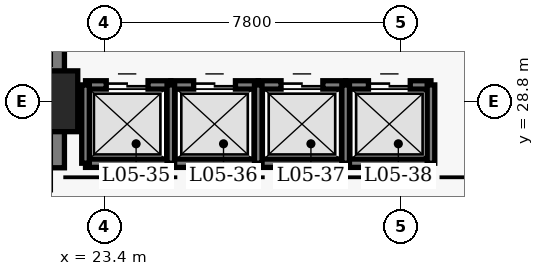
"""IFC4 building model, lengths in metres.
Left out: names, types, materials, properties, quantities, classifications, styles, units other than length and angle.
Written with IfcOpenShell. Run it as: python <this file> out.ifc"""

import sys

from ifc_helpers import new_model, si_unit, direction, frame, frame_2d, origin, origin_2d, place, context, subcontext, project, spatial, rectangle, extrude, element, fill, save


model = new_model("IFC4")
c1 = context("Model", 3, precision=1e-05, world=origin(), true_north=direction((0.0, 1.0)))
c2 = subcontext(c1, "Body", "Model", "MODEL_VIEW")
j1 = project(units=[si_unit("LENGTHUNIT", "METRE"), si_unit("PLANEANGLEUNIT", "RADIAN")], contexts=[c1])
p1 = place(None, origin())
s1 = spatial("IfcSite", under=j1, at=p1, CompositionType="ELEMENT")
p2 = place(p1, origin())
s2 = spatial("IfcBuilding", under=s1, at=p2, CompositionType="ELEMENT")
p3 = place(p2, frame((0.0, 0.0, 26.0)))
s3 = spatial("IfcBuildingStorey", under=s2, at=p3, CompositionType="ELEMENT", Elevation=26.0)
p4 = place(p3, frame((21.9, 27.05, 0.0), z_axis=(0.0, 0.0, 1.0), x_axis=(0.0, 1.0, 0.0)))
e1 = element("IfcWall", 1, at=p4, inside=s3, PredefinedType="SHEAR", context=c2, shape_type="SweptSolid", body=[
    extrude(rectangle(XDim=13.72, YDim=0.9, at=frame_2d((6.86, 0.0))), origin(), (0.0, 0.0, 1.0), 3.8),
])
p5 = place(p3, frame((21.9, 28.8, 0.0), z_axis=(0.0, 0.0, 1.0), x_axis=(1.0, 0.0, 0.0)))
e2 = element("IfcColumn", 2, at=p5, inside=s3, PredefinedType="COLUMN", context=c2, shape_type="SweptSolid", body=[
    extrude(rectangle(XDim=1.6, YDim=1.6, at=origin_2d()), origin(), (0.0, 0.0, 1.0), 3.8),
])
p6 = place(p3, frame((22.905, 29.23, 0.0), z_axis=(0.0, 0.0, 1.0), x_axis=(1.0, 0.0, 0.0)))
e3 = element("IfcWall", 3, at=p6, inside=s3, PredefinedType="SHEAR", context=c2, shape_type="SweptSolid", body=[
    extrude(rectangle(XDim=2.245, YDim=0.22, at=frame_2d((1.123, 0.0))), origin(), (0.0, 0.0, 1.0), 3.8),
])
p7 = place(p6, frame((0.545, 0.0, 0.0)))
e4 = element("IfcOpeningElement", 4, at=p7, cuts=e3, PredefinedType="OPENING", context=c2, shape_type="SweptSolid", body=[
    extrude(rectangle(XDim=1.1, YDim=2.15, at=frame_2d((0.55, 1.075))), frame((0.0, 0.12, 0.0), z_axis=(0.0, -1.0, 0.0), x_axis=(1.0, 0.0, 0.0)), (0.0, 0.0, 1.0), 0.24),
])
p8 = place(p3, frame((22.905, 27.17, 0.0), z_axis=(0.0, 0.0, 1.0), x_axis=(1.0, 0.0, 0.0)))
e5 = element("IfcWall", 5, at=p8, inside=s3, PredefinedType="SHEAR", context=c2, shape_type="SweptSolid", body=[
    extrude(rectangle(XDim=2.245, YDim=0.22, at=frame_2d((1.123, 0.0))), origin(), (0.0, 0.0, 1.0), 3.8),
])
p9 = place(p3, frame((22.905, 27.17, 0.0), z_axis=(0.0, 0.0, 1.0), x_axis=(0.0, 1.0, 0.0)))
e6 = element("IfcWall", 6, at=p9, inside=s3, PredefinedType="SHEAR", context=c2, shape_type="SweptSolid", body=[
    extrude(rectangle(XDim=2.06, YDim=0.2, at=frame_2d((1.03, 0.0))), origin(), (0.0, 0.0, 1.0), 3.8),
])
p10 = place(p3, frame((25.15, 29.23, 0.0), z_axis=(0.0, 0.0, 1.0), x_axis=(1.0, 0.0, 0.0)))
e7 = element("IfcWall", 7, at=p10, inside=s3, PredefinedType="SHEAR", context=c2, shape_type="SweptSolid", body=[
    extrude(rectangle(XDim=2.3, YDim=0.22, at=frame_2d((1.15, 0.0))), origin(), (0.0, 0.0, 1.0), 3.8),
])
p11 = place(p10, frame((0.6, 0.0, 0.0)))
e8 = element("IfcOpeningElement", 8, at=p11, cuts=e7, PredefinedType="OPENING", context=c2, shape_type="SweptSolid", body=[
    extrude(rectangle(XDim=1.1, YDim=2.15, at=frame_2d((0.55, 1.075))), frame((0.0, 0.12, 0.0), z_axis=(0.0, -1.0, 0.0), x_axis=(1.0, 0.0, 0.0)), (0.0, 0.0, 1.0), 0.24),
])
p12 = place(p3, frame((25.15, 27.17, 0.0), z_axis=(0.0, 0.0, 1.0), x_axis=(1.0, 0.0, 0.0)))
e9 = element("IfcWall", 9, at=p12, inside=s3, PredefinedType="SHEAR", context=c2, shape_type="SweptSolid", body=[
    extrude(rectangle(XDim=2.3, YDim=0.22, at=frame_2d((1.15, 0.0))), origin(), (0.0, 0.0, 1.0), 3.8),
])
p13 = place(p3, frame((25.15, 27.17, 0.0), z_axis=(0.0, 0.0, 1.0), x_axis=(0.0, 1.0, 0.0)))
e10 = element("IfcWall", 10, at=p13, inside=s3, PredefinedType="SHEAR", context=c2, shape_type="SweptSolid", body=[
    extrude(rectangle(XDim=2.06, YDim=0.2, at=frame_2d((1.03, 0.0))), origin(), (0.0, 0.0, 1.0), 3.8),
])
p14 = place(p3, frame((27.45, 29.23, 0.0), z_axis=(0.0, 0.0, 1.0), x_axis=(1.0, 0.0, 0.0)))
e11 = element("IfcWall", 11, at=p14, inside=s3, PredefinedType="SHEAR", context=c2, shape_type="SweptSolid", body=[
    extrude(rectangle(XDim=2.3, YDim=0.22, at=frame_2d((1.15, 0.0))), origin(), (0.0, 0.0, 1.0), 3.8),
])
p15 = place(p14, frame((0.6, 0.0, 0.0)))
e12 = element("IfcOpeningElement", 12, at=p15, cuts=e11, PredefinedType="OPENING", context=c2, shape_type="SweptSolid", body=[
    extrude(rectangle(XDim=1.1, YDim=2.15, at=frame_2d((0.55, 1.075))), frame((0.0, 0.12, 0.0), z_axis=(0.0, -1.0, 0.0), x_axis=(1.0, 0.0, 0.0)), (0.0, 0.0, 1.0), 0.24),
])
p16 = place(p3, frame((27.45, 27.17, 0.0), z_axis=(0.0, 0.0, 1.0), x_axis=(1.0, 0.0, 0.0)))
e13 = element("IfcWall", 13, at=p16, inside=s3, PredefinedType="SHEAR", context=c2, shape_type="SweptSolid", body=[
    extrude(rectangle(XDim=2.3, YDim=0.22, at=frame_2d((1.15, 0.0))), origin(), (0.0, 0.0, 1.0), 3.8),
])
p17 = place(p3, frame((27.45, 27.17, 0.0), z_axis=(0.0, 0.0, 1.0), x_axis=(0.0, 1.0, 0.0)))
e14 = element("IfcWall", 14, at=p17, inside=s3, PredefinedType="SHEAR", context=c2, shape_type="SweptSolid", body=[
    extrude(rectangle(XDim=2.06, YDim=0.2, at=frame_2d((1.03, 0.0))), origin(), (0.0, 0.0, 1.0), 3.8),
])
p18 = place(p3, frame((29.75, 29.23, 0.0), z_axis=(0.0, 0.0, 1.0), x_axis=(1.0, 0.0, 0.0)))
e15 = element("IfcWall", 15, at=p18, inside=s3, PredefinedType="SHEAR", context=c2, shape_type="SweptSolid", body=[
    extrude(rectangle(XDim=2.245, YDim=0.22, at=frame_2d((1.123, 0.0))), origin(), (0.0, 0.0, 1.0), 3.8),
])
p19 = place(p18, frame((0.6, 0.0, 0.0)))
e16 = element("IfcOpeningElement", 16, at=p19, cuts=e15, PredefinedType="OPENING", context=c2, shape_type="SweptSolid", body=[
    extrude(rectangle(XDim=1.1, YDim=2.15, at=frame_2d((0.55, 1.075))), frame((0.0, 0.12, 0.0), z_axis=(0.0, -1.0, 0.0), x_axis=(1.0, 0.0, 0.0)), (0.0, 0.0, 1.0), 0.24),
])
p20 = place(p3, frame((29.75, 27.17, 0.0), z_axis=(0.0, 0.0, 1.0), x_axis=(1.0, 0.0, 0.0)))
e17 = element("IfcWall", 17, at=p20, inside=s3, PredefinedType="SHEAR", context=c2, shape_type="SweptSolid", body=[
    extrude(rectangle(XDim=2.245, YDim=0.22, at=frame_2d((1.123, 0.0))), origin(), (0.0, 0.0, 1.0), 3.8),
])
for number, where, z_axis, x_axis in (
    (18, (29.75, 27.17, 0.0), (0.0, 0.0, 1.0), (0.0, 1.0, 0.0)),
    (19, (31.995, 27.17, 0.0), (0.0, 0.0, 1.0), (0.0, 1.0, 0.0)),
):
    element("IfcWall", number, at=place(p3, frame(where, z_axis=z_axis, x_axis=x_axis)), inside=s3, PredefinedType="SHEAR", context=c2, shape_type="SweptSolid", body=[
        extrude(rectangle(XDim=2.06, YDim=0.2, at=frame_2d((1.03, 0.0))), origin(), (0.0, 0.0, 1.0), 3.8),
    ])
p21 = place(p7, origin())
e20 = element("IfcDoor", 20, at=p21, inside=s3, OperationType="DOUBLE_DOOR_SLIDING", PredefinedType="DOOR", context=c2, shape_type="SweptSolid", body=[
    extrude(rectangle(XDim=1.1, YDim=2.15, at=frame_2d((0.55, 1.075))), frame((0.0, 0.025, 0.0), z_axis=(0.0, -1.0, 0.0), x_axis=(1.0, 0.0, 0.0)), (0.0, 0.0, 1.0), 0.05),
])
fill(e4, e20)
p22 = place(p11, origin())
e21 = element("IfcDoor", 21, at=p22, inside=s3, OperationType="DOUBLE_DOOR_SLIDING", PredefinedType="DOOR", context=c2, shape_type="SweptSolid", body=[
    extrude(rectangle(XDim=1.1, YDim=2.15, at=frame_2d((0.55, 1.075))), frame((0.0, 0.025, 0.0), z_axis=(0.0, -1.0, 0.0), x_axis=(1.0, 0.0, 0.0)), (0.0, 0.0, 1.0), 0.05),
])
fill(e8, e21)
p23 = place(p15, origin())
e22 = element("IfcDoor", 22, at=p23, inside=s3, OperationType="DOUBLE_DOOR_SLIDING", PredefinedType="DOOR", context=c2, shape_type="SweptSolid", body=[
    extrude(rectangle(XDim=1.1, YDim=2.15, at=frame_2d((0.55, 1.075))), frame((0.0, 0.025, 0.0), z_axis=(0.0, -1.0, 0.0), x_axis=(1.0, 0.0, 0.0)), (0.0, 0.0, 1.0), 0.05),
])
fill(e12, e22)
p24 = place(p19, origin())
e23 = element("IfcDoor", 23, at=p24, inside=s3, OperationType="DOUBLE_DOOR_SLIDING", PredefinedType="DOOR", context=c2, shape_type="SweptSolid", body=[
    extrude(rectangle(XDim=1.1, YDim=2.15, at=frame_2d((0.55, 1.075))), frame((0.0, 0.025, 0.0), z_axis=(0.0, -1.0, 0.0), x_axis=(1.0, 0.0, 0.0)), (0.0, 0.0, 1.0), 0.05),
])
fill(e16, e23)
save(model, sys.argv[1])
